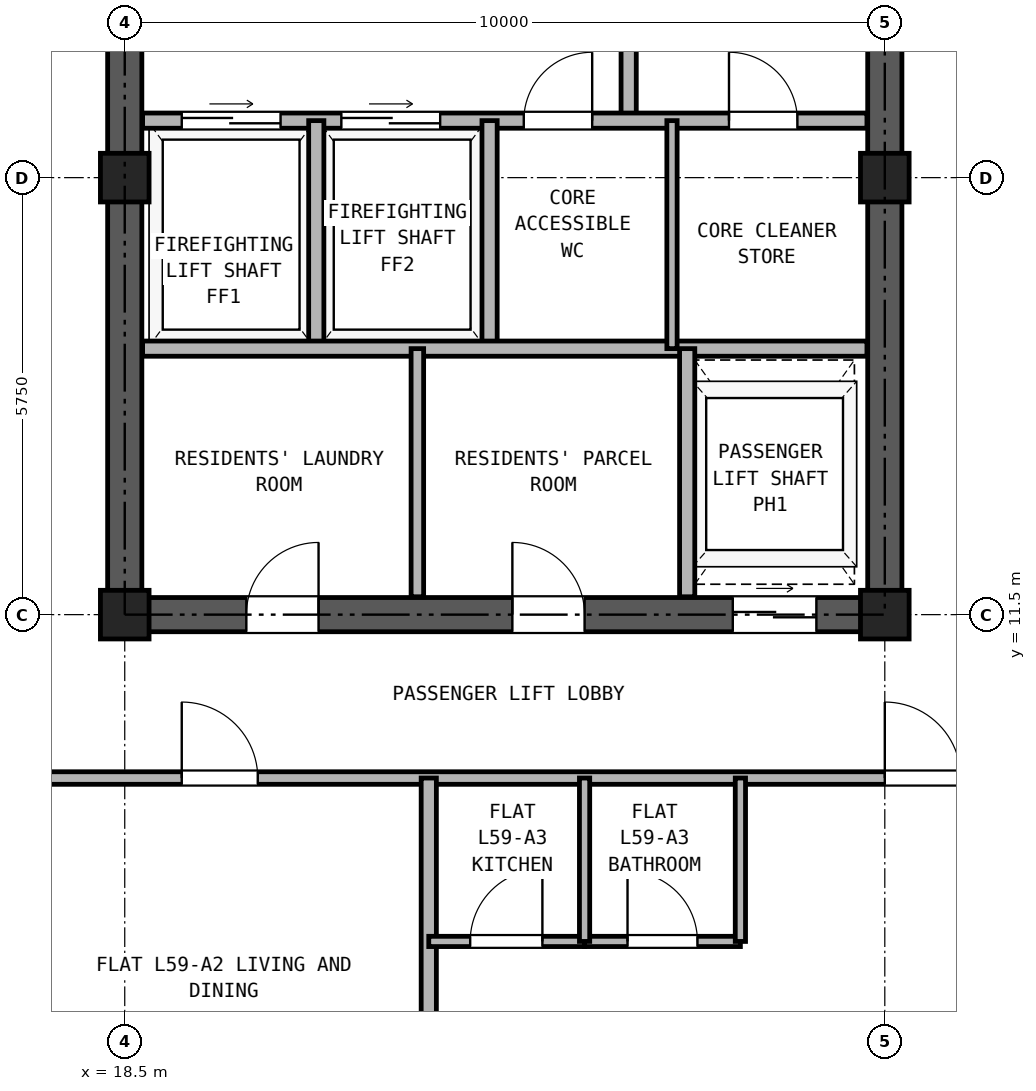
"""IFC4 building model, lengths in metres.
Left out: names, types, materials, properties, quantities, classifications, styles, units other than length and angle.
Written with IfcOpenShell. Run it as: python <this file> out.ifc"""

import sys

from ifc_helpers import new_model, si_unit, direction, frame, frame_2d, origin, origin_2d, place, context, subcontext, project, spatial, rectangle, hollow_rectangle, extrude, source, transform, mapped, element, fill, save


model = new_model("IFC4")
c1 = context("Model", 3, precision=1e-05, world=origin(), true_north=direction((0.0, 1.0)))
c2 = subcontext(c1, "Body", "Model", "MODEL_VIEW")
j1 = project(units=[si_unit("LENGTHUNIT", "METRE"), si_unit("PLANEANGLEUNIT", "RADIAN")], contexts=[c1])
p1 = place(None, origin())
s1 = spatial("IfcSite", under=j1, at=p1, CompositionType="ELEMENT")
p2 = place(p1, origin())
s2 = spatial("IfcBuilding", under=s1, at=p2, CompositionType="ELEMENT")
p3 = place(p2, frame((0.0, 0.0, 209.2)))
s3 = spatial("IfcBuildingStorey", under=s2, at=p3, CompositionType="ELEMENT", Elevation=209.2)
m1 = source(origin(), c2, "Body", "SweptSolid", [
    extrude(hollow_rectangle(XDim=0.64, YDim=0.64, WallThickness=0.035, at=origin_2d()), origin(), (0.0, 0.0, 1.0), 2.95),
])
for number, where, z_axis, x_axis in (
    (1, (18.5, 11.5, 0.0), (0.0, 0.0, 1.0), (1.0, 0.0, 0.0)),
    (2, (18.5, 17.25, 0.0), (0.0, 0.0, 1.0), (1.0, 0.0, 0.0)),
    (3, (28.5, 11.5, 0.0), (0.0, 0.0, 1.0), (1.0, 0.0, 0.0)),
    (4, (28.5, 17.25, 0.0), (0.0, 0.0, 1.0), (1.0, 0.0, 0.0)),
):
    element("IfcColumn", number, at=place(p3, frame(where, z_axis=z_axis, x_axis=x_axis)), inside=s3, PredefinedType="COLUMN", context=c2, shape_type="MappedRepresentation", body=[
        mapped(m1, transform((0.0, 0.0, 0.0), x_axis=(1.0, 0.0, 0.0), y_axis=(0.0, 1.0, 0.0), z_axis=(0.0, 0.0, 1.0), scale=1.0)),
    ])
p4 = place(p3, frame((18.275, 11.5, 0.0), z_axis=(0.0, 0.0, 1.0), x_axis=(1.0, 0.0, 0.0)))
e5 = element("IfcWall", 5, at=p4, inside=s3, PredefinedType="SHEAR", context=c2, shape_type="SweptSolid", body=[
    extrude(rectangle(XDim=10.45, YDim=0.45, at=frame_2d((5.225, 0.0))), origin(), (0.0, 0.0, 1.0), 2.95),
])
p5 = place(p4, frame((1.825, 0.0, 0.0)))
e6 = element("IfcOpeningElement", 6, at=p5, cuts=e5, PredefinedType="OPENING", context=c2, shape_type="SweptSolid", body=[
    extrude(rectangle(XDim=0.95, YDim=2.15, at=frame_2d((0.475, 1.075))), frame((0.0, 0.235, 0.0), z_axis=(0.0, -1.0, 0.0), x_axis=(1.0, 0.0, 0.0)), (0.0, 0.0, 1.0), 0.47),
])
p6 = place(p4, frame((5.325, 0.0, 0.0)))
e7 = element("IfcOpeningElement", 7, at=p6, cuts=e5, PredefinedType="OPENING", context=c2, shape_type="SweptSolid", body=[
    extrude(rectangle(XDim=0.95, YDim=2.15, at=frame_2d((0.475, 1.075))), frame((0.0, 0.235, 0.0), z_axis=(0.0, -1.0, 0.0), x_axis=(1.0, 0.0, 0.0)), (0.0, 0.0, 1.0), 0.47),
])
p7 = place(p4, frame((8.225, 0.0, 0.0)))
e8 = element("IfcOpeningElement", 8, at=p7, cuts=e5, PredefinedType="OPENING", context=c2, shape_type="SweptSolid", body=[
    extrude(rectangle(XDim=1.1, YDim=2.25, at=frame_2d((0.55, 1.125))), frame((0.0, 0.235, 0.0), z_axis=(0.0, -1.0, 0.0), x_axis=(1.0, 0.0, 0.0)), (0.0, 0.0, 1.0), 0.47),
])
p8 = place(p3, frame((18.5, 11.725, 0.0), z_axis=(0.0, 0.0, 1.0), x_axis=(0.0, 1.0, 0.0)))
e9 = element("IfcWall", 9, at=p8, inside=s3, PredefinedType="SHEAR", context=c2, shape_type="SweptSolid", body=[
    extrude(rectangle(XDim=16.8, YDim=0.45, at=frame_2d((8.4, 0.0))), origin(), (0.0, 0.0, 1.0), 2.95),
])
p9 = place(p8, frame((7.425, 0.0, 0.0)))
e10 = element("IfcOpeningElement", 10, at=p9, cuts=e9, PredefinedType="OPENING", context=c2, shape_type="SweptSolid", body=[
    extrude(rectangle(XDim=1.15, YDim=2.2, at=frame_2d((0.575, 1.1))), frame((0.0, 0.235, 0.0), z_axis=(0.0, -1.0, 0.0), x_axis=(1.0, 0.0, 0.0)), (0.0, 0.0, 1.0), 0.47),
])
p10 = place(p3, frame((28.5, 11.725, 0.0), z_axis=(0.0, 0.0, 1.0), x_axis=(0.0, 1.0, 0.0)))
e11 = element("IfcWall", 11, at=p10, inside=s3, PredefinedType="SHEAR", context=c2, shape_type="SweptSolid", body=[
    extrude(rectangle(XDim=16.8, YDim=0.45, at=frame_2d((8.4, 0.0))), origin(), (0.0, 0.0, 1.0), 2.95),
])
p11 = place(p10, frame((7.425, 0.0, 0.0)))
e12 = element("IfcOpeningElement", 12, at=p11, cuts=e11, PredefinedType="OPENING", context=c2, shape_type="SweptSolid", body=[
    extrude(rectangle(XDim=1.15, YDim=2.2, at=frame_2d((0.575, 1.1))), frame((0.0, 0.235, 0.0), z_axis=(0.0, -1.0, 0.0), x_axis=(1.0, 0.0, 0.0)), (0.0, 0.0, 1.0), 0.47),
])
p12 = place(p3, frame((25.13, 18.0, 0.0), z_axis=(0.0, 0.0, 1.0), x_axis=(0.0, 1.0, 0.0)))
e13 = element("IfcWall", 13, at=p12, inside=s3, PredefinedType="PARTITIONING", context=c2, shape_type="SweptSolid", body=[
    extrude(rectangle(XDim=3.39, YDim=0.2, at=frame_2d((1.695, 0.0))), origin(), (0.0, 0.0, 1.0), 2.95),
])
p13 = place(p12, frame((1.1, 0.0, 0.0)))
e14 = element("IfcOpeningElement", 14, at=p13, cuts=e13, PredefinedType="OPENING", context=c2, shape_type="SweptSolid", body=[
    extrude(rectangle(XDim=1.15, YDim=2.2, at=frame_2d((0.575, 1.1))), frame((0.0, 0.11, 0.0), z_axis=(0.0, -1.0, 0.0), x_axis=(1.0, 0.0, 0.0)), (0.0, 0.0, 1.0), 0.22),
])
p14 = place(p3, frame((18.735, 18.0, 0.0), z_axis=(0.0, 0.0, 1.0), x_axis=(1.0, 0.0, 0.0)))
e15 = element("IfcWall", 15, at=p14, inside=s3, PredefinedType="PARTITIONING", context=c2, shape_type="SweptSolid", body=[
    extrude(rectangle(XDim=9.53, YDim=0.2, at=frame_2d((4.765, 0.0))), origin(), (0.0, 0.0, 1.0), 2.95),
])
p15 = place(p14, frame((0.515, 0.0, 0.0)))
e16 = element("IfcOpeningElement", 16, at=p15, cuts=e15, PredefinedType="OPENING", context=c2, shape_type="SweptSolid", body=[
    extrude(rectangle(XDim=1.3, YDim=2.3, at=frame_2d((0.65, 1.15))), frame((0.0, 0.11, 0.0), z_axis=(0.0, -1.0, 0.0), x_axis=(1.0, 0.0, 0.0)), (0.0, 0.0, 1.0), 0.22),
])
p16 = place(p14, frame((2.615, 0.0, 0.0)))
e17 = element("IfcOpeningElement", 17, at=p16, cuts=e15, PredefinedType="OPENING", context=c2, shape_type="SweptSolid", body=[
    extrude(rectangle(XDim=1.3, YDim=2.3, at=frame_2d((0.65, 1.15))), frame((0.0, 0.11, 0.0), z_axis=(0.0, -1.0, 0.0), x_axis=(1.0, 0.0, 0.0)), (0.0, 0.0, 1.0), 0.22),
])
p17 = place(p14, frame((5.015, 0.0, 0.0)))
e18 = element("IfcOpeningElement", 18, at=p17, cuts=e15, PredefinedType="OPENING", context=c2, shape_type="SweptSolid", body=[
    extrude(rectangle(XDim=0.9, YDim=2.05, at=frame_2d((0.45, 1.025))), frame((0.0, 0.11, 0.0), z_axis=(0.0, -1.0, 0.0), x_axis=(1.0, 0.0, 0.0)), (0.0, 0.0, 1.0), 0.22),
])
p18 = place(p14, frame((7.715, 0.0, 0.0)))
e19 = element("IfcOpeningElement", 19, at=p18, cuts=e15, PredefinedType="OPENING", context=c2, shape_type="SweptSolid", body=[
    extrude(rectangle(XDim=0.9, YDim=2.05, at=frame_2d((0.45, 1.025))), frame((0.0, 0.11, 0.0), z_axis=(0.0, -1.0, 0.0), x_axis=(1.0, 0.0, 0.0)), (0.0, 0.0, 1.0), 0.22),
])
for number, where, z_axis, x_axis in (
    (20, (21.02, 15.0, 0.0), (0.0, 0.0, 1.0), (0.0, 1.0, 0.0)),
    (21, (23.3, 15.0, 0.0), (0.0, 0.0, 1.0), (0.0, 1.0, 0.0)),
):
    element("IfcWall", number, at=place(p3, frame(where, z_axis=z_axis, x_axis=x_axis)), inside=s3, PredefinedType="PARTITIONING", context=c2, shape_type="SweptSolid", body=[
        extrude(rectangle(XDim=3.0, YDim=0.2, at=frame_2d((1.5, 0.0))), origin(), (0.0, 0.0, 1.0), 2.95),
    ])
p19 = place(p3, frame((18.735, 15.0, 0.0), z_axis=(0.0, 0.0, 1.0), x_axis=(1.0, 0.0, 0.0)))
e22 = element("IfcWall", 22, at=p19, inside=s3, PredefinedType="PARTITIONING", context=c2, shape_type="SweptSolid", body=[
    extrude(rectangle(XDim=9.53, YDim=0.2, at=frame_2d((4.765, 0.0))), origin(), (0.0, 0.0, 1.0), 2.95),
])
p20 = place(p3, frame((25.7, 15.0, 0.0), z_axis=(0.0, 0.0, 1.0), x_axis=(0.0, 1.0, 0.0)))
e23 = element("IfcWall", 23, at=p20, inside=s3, PredefinedType="PARTITIONING", context=c2, shape_type="SweptSolid", body=[
    extrude(rectangle(XDim=3.0, YDim=0.135, at=frame_2d((1.5, 0.0))), origin(), (0.0, 0.0, 1.0), 2.95),
])
p21 = place(p3, frame((22.35, 11.735, 0.0), z_axis=(0.0, 0.0, 1.0), x_axis=(0.0, 1.0, 0.0)))
e24 = element("IfcWall", 24, at=p21, inside=s3, PredefinedType="PARTITIONING", context=c2, shape_type="SweptSolid", body=[
    extrude(rectangle(XDim=3.265, YDim=0.165, at=frame_2d((1.632, 0.0))), origin(), (0.0, 0.0, 1.0), 2.95),
])
p22 = place(p3, frame((25.9, 11.735, 0.0), z_axis=(0.0, 0.0, 1.0), x_axis=(0.0, 1.0, 0.0)))
e25 = element("IfcWall", 25, at=p22, inside=s3, PredefinedType="PARTITIONING", context=c2, shape_type="SweptSolid", body=[
    extrude(rectangle(XDim=3.265, YDim=0.2, at=frame_2d((1.632, 0.0))), origin(), (0.0, 0.0, 1.0), 2.95),
])
p23 = place(p3, frame((0.16, 9.35, 0.0), z_axis=(0.0, 0.0, 1.0), x_axis=(1.0, 0.0, 0.0)))
e26 = element("IfcWall", 26, at=p23, inside=s3, PredefinedType="PARTITIONING", context=c2, shape_type="SweptSolid", body=[
    extrude(rectangle(XDim=41.48, YDim=0.165, at=frame_2d((20.74, 0.0))), origin(), (0.0, 0.0, 1.0), 2.95),
])
p24 = place(p23, frame((9.64, 0.0, 0.0)))
e27 = element("IfcOpeningElement", 27, at=p24, cuts=e26, PredefinedType="OPENING", context=c2, shape_type="SweptSolid", body=[
    extrude(rectangle(XDim=1.0, YDim=2.15, at=frame_2d((0.5, 1.075))), frame((0.0, 0.093, 0.0), z_axis=(0.0, -1.0, 0.0), x_axis=(1.0, 0.0, 0.0)), (0.0, 0.0, 1.0), 0.185),
])
p25 = place(p23, frame((19.09, 0.0, 0.0)))
e28 = element("IfcOpeningElement", 28, at=p25, cuts=e26, PredefinedType="OPENING", context=c2, shape_type="SweptSolid", body=[
    extrude(rectangle(XDim=1.0, YDim=2.15, at=frame_2d((0.5, 1.075))), frame((0.0, 0.093, 0.0), z_axis=(0.0, -1.0, 0.0), x_axis=(1.0, 0.0, 0.0)), (0.0, 0.0, 1.0), 0.185),
])
p26 = place(p23, frame((28.34, 0.0, 0.0)))
e29 = element("IfcOpeningElement", 29, at=p26, cuts=e26, PredefinedType="OPENING", context=c2, shape_type="SweptSolid", body=[
    extrude(rectangle(XDim=1.0, YDim=2.15, at=frame_2d((0.5, 1.075))), frame((0.0, 0.093, 0.0), z_axis=(0.0, -1.0, 0.0), x_axis=(1.0, 0.0, 0.0)), (0.0, 0.0, 1.0), 0.185),
])
p27 = place(p23, frame((32.865, 0.0, 0.0)))
e30 = element("IfcOpeningElement", 30, at=p27, cuts=e26, PredefinedType="OPENING", context=c2, shape_type="SweptSolid", body=[
    extrude(rectangle(XDim=1.0, YDim=2.15, at=frame_2d((0.5, 1.075))), frame((0.0, 0.093, 0.0), z_axis=(0.0, -1.0, 0.0), x_axis=(1.0, 0.0, 0.0)), (0.0, 0.0, 1.0), 0.185),
])
p28 = place(p3, frame((22.5, 0.16, 0.0), z_axis=(0.0, 0.0, 1.0), x_axis=(0.0, 1.0, 0.0)))
e31 = element("IfcWall", 31, at=p28, inside=s3, PredefinedType="PARTITIONING", context=c2, shape_type="SweptSolid", body=[
    extrude(rectangle(XDim=9.19, YDim=0.2, at=frame_2d((4.595, 0.0))), origin(), (0.0, 0.0, 1.0), 2.95),
])
p29 = place(p3, frame((22.5, 7.2, 0.0), z_axis=(0.0, 0.0, 1.0), x_axis=(1.0, 0.0, 0.0)))
e32 = element("IfcWall", 32, at=p29, inside=s3, PredefinedType="PARTITIONING", context=c2, shape_type="SweptSolid", body=[
    extrude(rectangle(XDim=2.05, YDim=0.135, at=frame_2d((1.025, 0.0))), origin(), (0.0, 0.0, 1.0), 2.95),
])
p30 = place(p29, frame((0.545, 0.0, 0.0)))
e33 = element("IfcOpeningElement", 33, at=p30, cuts=e32, PredefinedType="OPENING", context=c2, shape_type="SweptSolid", body=[
    extrude(rectangle(XDim=0.95, YDim=2.15, at=frame_2d((0.475, 1.075))), frame((0.0, 0.077, 0.0), z_axis=(0.0, -1.0, 0.0), x_axis=(1.0, 0.0, 0.0)), (0.0, 0.0, 1.0), 0.155),
])
p31 = place(p3, frame((24.55, 7.2, 0.0), z_axis=(0.0, 0.0, 1.0), x_axis=(1.0, 0.0, 0.0)))
e34 = element("IfcWall", 34, at=p31, inside=s3, PredefinedType="PARTITIONING", context=c2, shape_type="SweptSolid", body=[
    extrude(rectangle(XDim=2.05, YDim=0.135, at=frame_2d((1.025, 0.0))), origin(), (0.0, 0.0, 1.0), 2.95),
])
p32 = place(p31, frame((0.565, 0.0, 0.0)))
e35 = element("IfcOpeningElement", 35, at=p32, cuts=e34, PredefinedType="OPENING", context=c2, shape_type="SweptSolid", body=[
    extrude(rectangle(XDim=0.92, YDim=2.1, at=frame_2d((0.46, 1.05))), frame((0.0, 0.077, 0.0), z_axis=(0.0, -1.0, 0.0), x_axis=(1.0, 0.0, 0.0)), (0.0, 0.0, 1.0), 0.155),
])
for number, where, z_axis, x_axis in (
    (36, (24.55, 7.2, 0.0), (0.0, 0.0, 1.0), (0.0, 1.0, 0.0)),
    (37, (26.6, 7.2, 0.0), (0.0, 0.0, 1.0), (0.0, 1.0, 0.0)),
):
    element("IfcWall", number, at=place(p3, frame(where, z_axis=z_axis, x_axis=x_axis)), inside=s3, PredefinedType="PARTITIONING", context=c2, shape_type="SweptSolid", body=[
        extrude(rectangle(XDim=2.15, YDim=0.135, at=frame_2d((1.075, 0.0))), origin(), (0.0, 0.0, 1.0), 2.95),
    ])
p33 = place(p15, origin())
e38 = element("IfcDoor", 38, at=p33, inside=s3, OperationType="DOUBLE_DOOR_SLIDING", PredefinedType="DOOR", context=c2, shape_type="SweptSolid", body=[
    extrude(rectangle(XDim=1.3, YDim=2.3, at=frame_2d((0.65, 1.15))), frame((0.0, 0.025, 0.0), z_axis=(0.0, -1.0, 0.0), x_axis=(1.0, 0.0, 0.0)), (0.0, 0.0, 1.0), 0.05),
])
fill(e16, e38)
p34 = place(p16, origin())
e39 = element("IfcDoor", 39, at=p34, inside=s3, OperationType="DOUBLE_DOOR_SLIDING", PredefinedType="DOOR", context=c2, shape_type="SweptSolid", body=[
    extrude(rectangle(XDim=1.3, YDim=2.3, at=frame_2d((0.65, 1.15))), frame((0.0, 0.025, 0.0), z_axis=(0.0, -1.0, 0.0), x_axis=(1.0, 0.0, 0.0)), (0.0, 0.0, 1.0), 0.05),
])
fill(e17, e39)
p35 = place(p17, frame((0.9, 0.0, 0.0), z_axis=(0.0, 0.0, 1.0), x_axis=(-1.0, 0.0, 0.0)))
e40 = element("IfcDoor", 40, at=p35, inside=s3, OperationType="SINGLE_SWING_RIGHT", PredefinedType="DOOR", context=c2, shape_type="SweptSolid", body=[
    extrude(rectangle(XDim=0.9, YDim=2.05, at=frame_2d((0.45, 1.025))), frame((0.0, 0.025, 0.0), z_axis=(0.0, -1.0, 0.0), x_axis=(1.0, 0.0, 0.0)), (0.0, 0.0, 1.0), 0.05),
])
fill(e18, e40)
p36 = place(p18, frame((0.9, 0.0, 0.0), z_axis=(0.0, 0.0, 1.0), x_axis=(-1.0, 0.0, 0.0)))
e41 = element("IfcDoor", 41, at=p36, inside=s3, OperationType="SINGLE_SWING_LEFT", PredefinedType="DOOR", context=c2, shape_type="SweptSolid", body=[
    extrude(rectangle(XDim=0.9, YDim=2.05, at=frame_2d((0.45, 1.025))), frame((0.0, 0.025, 0.0), z_axis=(0.0, -1.0, 0.0), x_axis=(1.0, 0.0, 0.0)), (0.0, 0.0, 1.0), 0.05),
])
fill(e19, e41)
p37 = place(p5, frame((0.95, 0.0, 0.0), z_axis=(0.0, 0.0, 1.0), x_axis=(-1.0, 0.0, 0.0)))
e42 = element("IfcDoor", 42, at=p37, inside=s3, OperationType="SINGLE_SWING_RIGHT", PredefinedType="DOOR", context=c2, shape_type="SweptSolid", body=[
    extrude(rectangle(XDim=0.95, YDim=2.15, at=frame_2d((0.475, 1.075))), frame((0.0, 0.025, 0.0), z_axis=(0.0, -1.0, 0.0), x_axis=(1.0, 0.0, 0.0)), (0.0, 0.0, 1.0), 0.05),
])
fill(e6, e42)
p38 = place(p6, frame((0.95, 0.0, 0.0), z_axis=(0.0, 0.0, 1.0), x_axis=(-1.0, 0.0, 0.0)))
e43 = element("IfcDoor", 43, at=p38, inside=s3, OperationType="SINGLE_SWING_LEFT", PredefinedType="DOOR", context=c2, shape_type="SweptSolid", body=[
    extrude(rectangle(XDim=0.95, YDim=2.15, at=frame_2d((0.475, 1.075))), frame((0.0, 0.025, 0.0), z_axis=(0.0, -1.0, 0.0), x_axis=(1.0, 0.0, 0.0)), (0.0, 0.0, 1.0), 0.05),
])
fill(e7, e43)
p39 = place(p7, frame((1.1, 0.0, 0.0), z_axis=(0.0, 0.0, 1.0), x_axis=(-1.0, 0.0, 0.0)))
e44 = element("IfcDoor", 44, at=p39, inside=s3, OperationType="DOUBLE_DOOR_SLIDING", PredefinedType="DOOR", context=c2, shape_type="SweptSolid", body=[
    extrude(rectangle(XDim=1.1, YDim=2.25, at=frame_2d((0.55, 1.125))), frame((0.0, 0.025, 0.0), z_axis=(0.0, -1.0, 0.0), x_axis=(1.0, 0.0, 0.0)), (0.0, 0.0, 1.0), 0.05),
])
fill(e8, e44)
p40 = place(p25, frame((1.0, 0.0, 0.0), z_axis=(0.0, 0.0, 1.0), x_axis=(-1.0, 0.0, 0.0)))
e45 = element("IfcDoor", 45, at=p40, inside=s3, OperationType="SINGLE_SWING_LEFT", PredefinedType="DOOR", context=c2, shape_type="SweptSolid", body=[
    extrude(rectangle(XDim=1.0, YDim=2.15, at=frame_2d((0.5, 1.075))), frame((0.0, 0.025, 0.0), z_axis=(0.0, -1.0, 0.0), x_axis=(1.0, 0.0, 0.0)), (0.0, 0.0, 1.0), 0.05),
])
fill(e28, e45)
p41 = place(p30, origin())
e46 = element("IfcDoor", 46, at=p41, inside=s3, OperationType="SINGLE_SWING_RIGHT", PredefinedType="DOOR", context=c2, shape_type="SweptSolid", body=[
    extrude(rectangle(XDim=0.95, YDim=2.15, at=frame_2d((0.475, 1.075))), frame((0.0, 0.025, 0.0), z_axis=(0.0, -1.0, 0.0), x_axis=(1.0, 0.0, 0.0)), (0.0, 0.0, 1.0), 0.05),
])
fill(e33, e46)
p42 = place(p32, origin())
e47 = element("IfcDoor", 47, at=p42, inside=s3, OperationType="SINGLE_SWING_LEFT", PredefinedType="DOOR", context=c2, shape_type="SweptSolid", body=[
    extrude(rectangle(XDim=0.92, YDim=2.1, at=frame_2d((0.46, 1.05))), frame((0.0, 0.025, 0.0), z_axis=(0.0, -1.0, 0.0), x_axis=(1.0, 0.0, 0.0)), (0.0, 0.0, 1.0), 0.05),
])
fill(e35, e47)
p43 = place(p26, frame((1.0, 0.0, 0.0), z_axis=(0.0, 0.0, 1.0), x_axis=(-1.0, 0.0, 0.0)))
e48 = element("IfcDoor", 48, at=p43, inside=s3, OperationType="SINGLE_SWING_LEFT", PredefinedType="DOOR", context=c2, shape_type="SweptSolid", body=[
    extrude(rectangle(XDim=1.0, YDim=2.15, at=frame_2d((0.5, 1.075))), frame((0.0, 0.025, 0.0), z_axis=(0.0, -1.0, 0.0), x_axis=(1.0, 0.0, 0.0)), (0.0, 0.0, 1.0), 0.05),
])
fill(e29, e48)
save(model, sys.argv[1])
